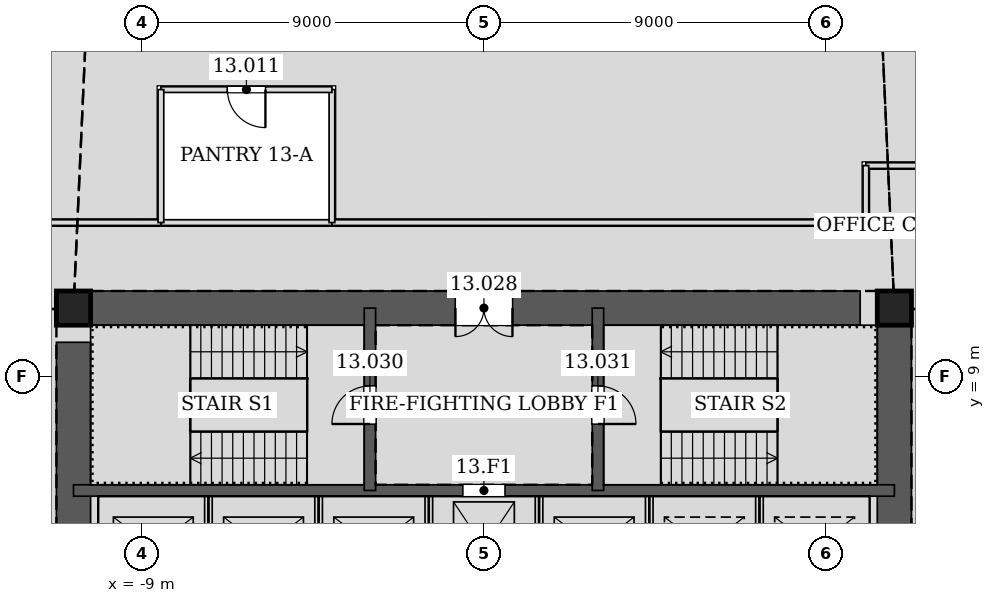
"""IFC4 building model, lengths in metres.
Left out: names, types, materials, properties, quantities, classifications, styles, units other than length and angle.
Written with IfcOpenShell. Run it as: python <this file> out.ifc"""

import sys

from ifc_helpers import new_model, si_unit, direction, frame, frame_2d, origin, origin_2d, place, context, subcontext, project, spatial, rectangle, hollow_rectangle, extrude, element, fill, save


model = new_model("IFC4")
c1 = context("Model", 3, precision=1e-05, world=origin(), true_north=direction((0.0, 1.0)))
c2 = subcontext(c1, "Body", "Model", "MODEL_VIEW")
j1 = project(units=[si_unit("LENGTHUNIT", "METRE"), si_unit("PLANEANGLEUNIT", "RADIAN")], contexts=[c1])
p1 = place(None, origin())
s1 = spatial("IfcSite", under=j1, at=p1, CompositionType="ELEMENT")
p2 = place(p1, origin())
s2 = spatial("IfcBuilding", under=s1, at=p2, CompositionType="ELEMENT")
p3 = place(p2, frame((0.0, 0.0, 62.4)))
s3 = spatial("IfcBuildingStorey", under=s2, at=p3, CompositionType="ELEMENT", Elevation=62.4)
for number, where, z_axis, x_axis in (
    (1, (10.8, 10.8, 0.0), (0.0, 0.0, 1.0), (1.0, 0.0, 0.0)),
    (2, (-10.8, 10.8, 0.0), (0.0, 0.0, 1.0), (1.0, 0.0, 0.0)),
):
    element("IfcColumn", number, at=place(p3, frame(where, z_axis=z_axis, x_axis=x_axis)), inside=s3, PredefinedType="COLUMN", context=c2, shape_type="SweptSolid", body=[
        extrude(hollow_rectangle(XDim=0.9, YDim=0.9, WallThickness=0.06, at=origin_2d()), origin(), (0.0, 0.0, 1.0), 4.2),
    ])
p4 = place(p3, frame((10.8, -10.8, 0.0), z_axis=(0.0, 0.0, 1.0), x_axis=(0.0, 1.0, 0.0)))
e3 = element("IfcWall", 3, at=p4, inside=s3, PredefinedType="SOLIDWALL", context=c2, shape_type="SweptSolid", body=[
    extrude(rectangle(XDim=21.6, YDim=0.9, at=frame_2d((10.8, 0.0))), origin(), (0.0, 0.0, 1.0), 4.2),
])
p5 = place(p4, frame((11.7, 0.0, 0.0)))
e4 = element("IfcOpeningElement", 4, at=p5, cuts=e3, PredefinedType="OPENING", context=c2, shape_type="SweptSolid", body=[
    extrude(rectangle(XDim=1.2, YDim=2.1, at=frame_2d((0.6, 1.05))), frame((0.0, 0.46, 0.0), z_axis=(0.0, -1.0, 0.0), x_axis=(1.0, 0.0, 0.0)), (0.0, 0.0, 1.0), 0.92),
])
p6 = place(p4, frame((8.7, 0.0, 0.0)))
e5 = element("IfcOpeningElement", 5, at=p6, cuts=e3, PredefinedType="OPENING", context=c2, shape_type="SweptSolid", body=[
    extrude(rectangle(XDim=1.2, YDim=2.1, at=frame_2d((0.6, 1.05))), frame((0.0, 0.46, 0.0), z_axis=(0.0, -1.0, 0.0), x_axis=(1.0, 0.0, 0.0)), (0.0, 0.0, 1.0), 0.92),
])
p7 = place(p3, frame((10.8, 10.8, 0.0), z_axis=(0.0, 0.0, 1.0), x_axis=(-1.0, 0.0, 0.0)))
e6 = element("IfcWall", 6, at=p7, inside=s3, PredefinedType="SOLIDWALL", context=c2, shape_type="SweptSolid", body=[
    extrude(rectangle(XDim=21.6, YDim=0.9, at=frame_2d((10.8, 0.0))), origin(), (0.0, 0.0, 1.0), 4.2),
])
p8 = place(p7, frame((10.05, 0.0, 0.0)))
e7 = element("IfcOpeningElement", 7, at=p8, cuts=e6, PredefinedType="OPENING", context=c2, shape_type="SweptSolid", body=[
    extrude(rectangle(XDim=1.5, YDim=2.1, at=frame_2d((0.75, 1.05))), frame((0.0, 0.46, 0.0), z_axis=(0.0, -1.0, 0.0), x_axis=(1.0, 0.0, 0.0)), (0.0, 0.0, 1.0), 0.92),
])
p9 = place(p3, frame((-10.8, 10.8, 0.0), z_axis=(0.0, 0.0, 1.0), x_axis=(0.0, -1.0, 0.0)))
e8 = element("IfcWall", 8, at=p9, inside=s3, PredefinedType="SOLIDWALL", context=c2, shape_type="SweptSolid", body=[
    extrude(rectangle(XDim=21.6, YDim=0.9, at=frame_2d((10.8, 0.0))), origin(), (0.0, 0.0, 1.0), 4.2),
])
p10 = place(p9, frame((8.7, 0.0, 0.0)))
e9 = element("IfcOpeningElement", 9, at=p10, cuts=e8, PredefinedType="OPENING", context=c2, shape_type="SweptSolid", body=[
    extrude(rectangle(XDim=1.2, YDim=2.1, at=frame_2d((0.6, 1.05))), frame((0.0, 0.46, 0.0), z_axis=(0.0, -1.0, 0.0), x_axis=(1.0, 0.0, 0.0)), (0.0, 0.0, 1.0), 0.92),
])
p11 = place(p9, frame((11.7, 0.0, 0.0)))
e10 = element("IfcOpeningElement", 10, at=p11, cuts=e8, PredefinedType="OPENING", context=c2, shape_type="SweptSolid", body=[
    extrude(rectangle(XDim=1.2, YDim=2.1, at=frame_2d((0.6, 1.05))), frame((0.0, 0.46, 0.0), z_axis=(0.0, -1.0, 0.0), x_axis=(1.0, 0.0, 0.0)), (0.0, 0.0, 1.0), 0.92),
])
p12 = place(p3, frame((-10.8, 6.0, 0.0), z_axis=(0.0, 0.0, 1.0), x_axis=(1.0, 0.0, 0.0)))
e11 = element("IfcWall", 11, at=p12, inside=s3, PredefinedType="SOLIDWALL", context=c2, shape_type="SweptSolid", body=[
    extrude(rectangle(XDim=21.6, YDim=0.3, at=frame_2d((10.8, 0.0))), origin(), (0.0, 0.0, 1.0), 4.2),
])
p13 = place(p12, frame((10.25, 0.0, 0.0)))
e12 = element("IfcOpeningElement", 12, at=p13, cuts=e11, PredefinedType="OPENING", context=c2, shape_type="SweptSolid", body=[
    extrude(rectangle(XDim=1.1, YDim=2.1, at=frame_2d((0.55, 1.05))), frame((0.0, 0.16, 0.0), z_axis=(0.0, -1.0, 0.0), x_axis=(1.0, 0.0, 0.0)), (0.0, 0.0, 1.0), 0.32),
])
p14 = place(p3, frame((-3.0, 6.0, 0.0), z_axis=(0.0, 0.0, 1.0), x_axis=(0.0, 1.0, 0.0)))
e13 = element("IfcWall", 13, at=p14, inside=s3, PredefinedType="SOLIDWALL", context=c2, shape_type="SweptSolid", body=[
    extrude(rectangle(XDim=4.8, YDim=0.3, at=frame_2d((2.4, 0.0))), origin(), (0.0, 0.0, 1.0), 4.2),
])
p15 = place(p14, frame((1.75, 0.0, 0.0)))
e14 = element("IfcOpeningElement", 14, at=p15, cuts=e13, PredefinedType="OPENING", context=c2, shape_type="SweptSolid", body=[
    extrude(rectangle(XDim=1.0, YDim=2.1, at=frame_2d((0.5, 1.05))), frame((0.0, 0.16, 0.0), z_axis=(0.0, -1.0, 0.0), x_axis=(1.0, 0.0, 0.0)), (0.0, 0.0, 1.0), 0.32),
])
p16 = place(p3, frame((3.0, 6.0, 0.0), z_axis=(0.0, 0.0, 1.0), x_axis=(0.0, 1.0, 0.0)))
e15 = element("IfcWall", 15, at=p16, inside=s3, PredefinedType="SOLIDWALL", context=c2, shape_type="SweptSolid", body=[
    extrude(rectangle(XDim=4.8, YDim=0.3, at=frame_2d((2.4, 0.0))), origin(), (0.0, 0.0, 1.0), 4.2),
])
p17 = place(p16, frame((1.75, 0.0, 0.0)))
e16 = element("IfcOpeningElement", 16, at=p17, cuts=e15, PredefinedType="OPENING", context=c2, shape_type="SweptSolid", body=[
    extrude(rectangle(XDim=1.0, YDim=2.1, at=frame_2d((0.5, 1.05))), frame((0.0, 0.16, 0.0), z_axis=(0.0, -1.0, 0.0), x_axis=(1.0, 0.0, 0.0)), (0.0, 0.0, 1.0), 0.32),
])
p18 = place(p3, frame((-3.999, 13.05, 0.0), z_axis=(0.0, 0.0, 1.0), x_axis=(-1.0, 0.0, 0.0)))
e17 = element("IfcWall", 17, at=p18, inside=s3, PredefinedType="PARTITIONING", context=c2, shape_type="SweptSolid", body=[
    extrude(rectangle(XDim=4.502, YDim=0.15, at=frame_2d((2.251, 0.0))), origin(), (0.0, 0.0, 1.0), 4.035),
])
p19 = place(p3, frame((-8.499, 13.05, 0.0), z_axis=(0.0, 0.0, 1.0), x_axis=(-1.0, 0.0, 0.0)))
e18 = element("IfcWall", 18, at=p19, inside=s3, PredefinedType="PARTITIONING", context=c2, shape_type="SweptSolid", body=[
    extrude(rectangle(XDim=4.551, YDim=0.15, at=frame_2d((2.275, 0.0))), origin(), (0.0, 0.0, 1.0), 3.014),
])
p20 = place(p3, frame((14.55, 14.55, 0.0), z_axis=(0.0, 0.0, 1.0), x_axis=(-1.0, 0.0, 0.0)))
e19 = element("IfcWall", 19, at=p20, inside=s3, PredefinedType="PARTITIONING", context=c2, shape_type="SweptSolid", body=[
    extrude(rectangle(XDim=4.5, YDim=0.15, at=frame_2d((2.25, 0.0))), origin(), (0.0, 0.0, 1.0), 3.014),
])
p21 = place(p3, frame((10.05, 14.55, 0.0), z_axis=(0.0, 0.0, 1.0), x_axis=(0.0, -1.0, 0.0)))
e20 = element("IfcWall", 20, at=p21, inside=s3, PredefinedType="PARTITIONING", context=c2, shape_type="SweptSolid", body=[
    extrude(rectangle(XDim=1.5, YDim=0.15, at=frame_2d((0.75, 0.0))), origin(), (0.0, 0.0, 1.0), 3.423),
])
p22 = place(p3, frame((10.05, 13.05, 0.0), z_axis=(0.0, 0.0, 1.0), x_axis=(-1.0, 0.0, 0.0)))
e21 = element("IfcWall", 21, at=p22, inside=s3, PredefinedType="PARTITIONING", context=c2, shape_type="SweptSolid", body=[
    extrude(rectangle(XDim=14.051, YDim=0.15, at=frame_2d((7.025, 0.0))), origin(), (0.0, 0.0, 1.0), 2.984),
])
p23 = place(p3, frame((-4.0, 13.05, 0.0), z_axis=(0.0, 0.0, 1.0), x_axis=(0.0, 1.0, 0.0)))
e22 = element("IfcWall", 22, at=p23, inside=s3, PredefinedType="PARTITIONING", context=c2, shape_type="SweptSolid", body=[
    extrude(rectangle(XDim=3.5, YDim=0.15, at=frame_2d((1.75, 0.0))), origin(), (0.0, 0.0, 1.0), 3.423),
])
p24 = place(p3, frame((-4.0, 16.55, 0.0), z_axis=(0.0, 0.0, 1.0), x_axis=(-1.0, 0.0, 0.0)))
e23 = element("IfcWall", 23, at=p24, inside=s3, PredefinedType="PARTITIONING", context=c2, shape_type="SweptSolid", body=[
    extrude(rectangle(XDim=4.5, YDim=0.15, at=frame_2d((2.25, 0.0))), origin(), (0.0, 0.0, 1.0), 3.497),
])
p25 = place(p24, frame((1.75, 0.0, 0.0)))
e24 = element("IfcOpeningElement", 24, at=p25, cuts=e23, PredefinedType="OPENING", context=c2, shape_type="SweptSolid", body=[
    extrude(rectangle(XDim=1.0, YDim=2.1, at=frame_2d((0.5, 1.05))), frame((0.0, 0.085, 0.0), z_axis=(0.0, -1.0, 0.0), x_axis=(1.0, 0.0, 0.0)), (0.0, 0.0, 1.0), 0.17),
])
p26 = place(p3, frame((-8.5, 16.55, 0.0), z_axis=(0.0, 0.0, 1.0), x_axis=(0.0, -1.0, 0.0)))
e25 = element("IfcWall", 25, at=p26, inside=s3, PredefinedType="PARTITIONING", context=c2, shape_type="SweptSolid", body=[
    extrude(rectangle(XDim=3.5, YDim=0.15, at=frame_2d((1.75, 0.0))), origin(), (0.0, 0.0, 1.0), 3.423),
])
for number, where, z_axis, x_axis in (
    (26, (-7.25, 3.15, 0.0), (0.0, 0.0, 1.0), (0.0, 1.0, 0.0)),
    (27, (-4.35, 3.15, 0.0), (0.0, 0.0, 1.0), (0.0, 1.0, 0.0)),
    (28, (-1.45, 3.15, 0.0), (0.0, 0.0, 1.0), (0.0, 1.0, 0.0)),
    (29, (1.45, 3.15, 0.0), (0.0, 0.0, 1.0), (0.0, 1.0, 0.0)),
    (30, (4.35, 3.15, 0.0), (0.0, 0.0, 1.0), (0.0, 1.0, 0.0)),
    (31, (7.25, 3.15, 0.0), (0.0, 0.0, 1.0), (0.0, 1.0, 0.0)),
):
    element("IfcWall", number, at=place(p3, frame(where, z_axis=z_axis, x_axis=x_axis)), inside=s3, PredefinedType="PARTITIONING", context=c2, shape_type="SweptSolid", body=[
        extrude(rectangle(XDim=2.7, YDim=0.2, at=frame_2d((1.35, 0.0))), origin(), (0.0, 0.0, 1.0), 4.2),
    ])
p27 = place(p25, origin())
e32 = element("IfcDoor", 32, at=p27, inside=s3, OperationType="SINGLE_SWING_LEFT", PredefinedType="DOOR", context=c2, shape_type="SweptSolid", body=[
    extrude(rectangle(XDim=1.0, YDim=2.1, at=frame_2d((0.5, 1.05))), frame((0.0, 0.025, 0.0), z_axis=(0.0, -1.0, 0.0), x_axis=(1.0, 0.0, 0.0)), (0.0, 0.0, 1.0), 0.05),
])
fill(e24, e32)
p28 = place(p8, origin())
e33 = element("IfcDoor", 33, at=p28, inside=s3, OperationType="DOUBLE_DOOR_SINGLE_SWING", PredefinedType="DOOR", context=c2, shape_type="SweptSolid", body=[
    extrude(rectangle(XDim=1.5, YDim=2.1, at=frame_2d((0.75, 1.05))), frame((0.0, 0.025, 0.0), z_axis=(0.0, -1.0, 0.0), x_axis=(1.0, 0.0, 0.0)), (0.0, 0.0, 1.0), 0.05),
])
fill(e7, e33)
p29 = place(p15, origin())
e34 = element("IfcDoor", 34, at=p29, inside=s3, OperationType="SINGLE_SWING_LEFT", PredefinedType="DOOR", context=c2, shape_type="SweptSolid", body=[
    extrude(rectangle(XDim=1.0, YDim=2.1, at=frame_2d((0.5, 1.05))), frame((0.0, 0.025, 0.0), z_axis=(0.0, -1.0, 0.0), x_axis=(1.0, 0.0, 0.0)), (0.0, 0.0, 1.0), 0.05),
])
fill(e14, e34)
p30 = place(p17, frame((1.0, 0.0, 0.0), z_axis=(0.0, 0.0, 1.0), x_axis=(-1.0, 0.0, 0.0)))
e35 = element("IfcDoor", 35, at=p30, inside=s3, OperationType="SINGLE_SWING_RIGHT", PredefinedType="DOOR", context=c2, shape_type="SweptSolid", body=[
    extrude(rectangle(XDim=1.0, YDim=2.1, at=frame_2d((0.5, 1.05))), frame((0.0, 0.025, 0.0), z_axis=(0.0, -1.0, 0.0), x_axis=(1.0, 0.0, 0.0)), (0.0, 0.0, 1.0), 0.05),
])
fill(e16, e35)
p31 = place(p13, origin())
e36 = element("IfcDoor", 36, at=p31, inside=s3, OperationType="DOUBLE_DOOR_SLIDING", PredefinedType="DOOR", context=c2, shape_type="SweptSolid", body=[
    extrude(rectangle(XDim=1.1, YDim=2.1, at=frame_2d((0.55, 1.05))), frame((0.0, 0.025, 0.0), z_axis=(0.0, -1.0, 0.0), x_axis=(1.0, 0.0, 0.0)), (0.0, 0.0, 1.0), 0.05),
])
fill(e12, e36)
save(model, sys.argv[1])
